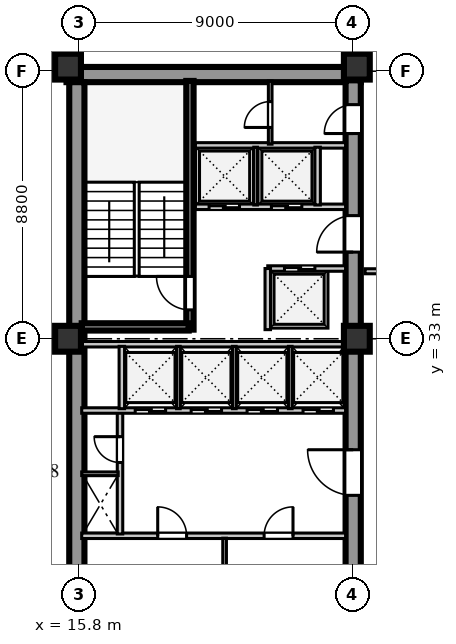
"""IFC4 building model, lengths in metres.
Left out: names, types, materials, properties, quantities, classifications, styles, units other than length and angle.
Written with IfcOpenShell. Run it as: python <this file> out.ifc"""

import sys

from ifc_helpers import new_model, si_unit, direction, frame, frame_2d, origin, origin_2d, place, context, subcontext, project, spatial, rectangle, extrude, element, fill, save


model = new_model("IFC4")
c1 = context("Model", 3, precision=1e-05, world=origin(), true_north=direction((0.0, 1.0)))
c2 = subcontext(c1, "Body", "Model", "MODEL_VIEW")
j1 = project(units=[si_unit("LENGTHUNIT", "METRE"), si_unit("PLANEANGLEUNIT", "RADIAN")], contexts=[c1])
p1 = place(None, origin())
s1 = spatial("IfcSite", under=j1, at=p1, CompositionType="ELEMENT")
p2 = place(p1, origin())
s2 = spatial("IfcBuilding", under=s1, at=p2, CompositionType="ELEMENT")
p3 = place(p2, frame((0.0, 0.0, 142.5)))
s3 = spatial("IfcBuildingStorey", under=s2, at=p3, CompositionType="ELEMENT", Elevation=142.5)
p4 = place(p3, frame((15.4, 41.69, 0.0), z_axis=(0.0, 0.0, 1.0), x_axis=(1.0, 0.0, 0.0)))
e1 = element("IfcWall", 1, at=p4, inside=s3, PredefinedType="SHEAR", context=c2, shape_type="SweptSolid", body=[
    extrude(rectangle(XDim=9.68, YDim=0.5, at=frame_2d((4.84, 0.0))), origin(), (0.0, 0.0, 1.0), 3.6),
])
p5 = place(p3, frame((15.74, 15.81, 0.0), z_axis=(0.0, 0.0, 1.0), x_axis=(0.0, 1.0, 0.0)))
e2 = element("IfcWall", 2, at=p5, inside=s3, PredefinedType="SHEAR", context=c2, shape_type="SweptSolid", body=[
    extrude(rectangle(XDim=25.63, YDim=0.5, at=frame_2d((12.815, 0.0))), origin(), (0.0, 0.0, 1.0), 3.6),
])
p6 = place(p3, frame((24.83, 15.74, 0.0), z_axis=(0.0, 0.0, 1.0), x_axis=(0.0, 1.0, 0.0)))
e3 = element("IfcWall", 3, at=p6, inside=s3, PredefinedType="SHEAR", context=c2, shape_type="SweptSolid", body=[
    extrude(rectangle(XDim=25.76, YDim=0.5, at=frame_2d((12.88, 0.0))), origin(), (0.0, 0.0, 1.0), 3.6),
])
p7 = place(p6, frame((1.61, 0.0, 0.0)))
e4 = element("IfcOpeningElement", 4, at=p7, cuts=e3, PredefinedType="OPENING", context=c2, shape_type="SweptSolid", body=[
    extrude(rectangle(XDim=1.2, YDim=2.1, at=frame_2d((0.6, 1.05))), frame((0.0, 0.26, 0.0), z_axis=(0.0, -1.0, 0.0), x_axis=(1.0, 0.0, 0.0)), (0.0, 0.0, 1.0), 0.52),
])
p8 = place(p6, frame((6.78, 0.0, 0.0)))
e5 = element("IfcOpeningElement", 5, at=p8, cuts=e3, PredefinedType="OPENING", context=c2, shape_type="SweptSolid", body=[
    extrude(rectangle(XDim=0.85, YDim=2.06, at=frame_2d((0.425, 1.03))), frame((0.0, 0.26, 0.0), z_axis=(0.0, -1.0, 0.0), x_axis=(1.0, 0.0, 0.0)), (0.0, 0.0, 1.0), 0.52),
])
p9 = place(p6, frame((12.11, 0.0, 0.0)))
e6 = element("IfcOpeningElement", 6, at=p9, cuts=e3, PredefinedType="OPENING", context=c2, shape_type="SweptSolid", body=[
    extrude(rectangle(XDim=1.5, YDim=2.12, at=frame_2d((0.75, 1.06))), frame((0.0, 0.26, 0.0), z_axis=(0.0, -1.0, 0.0), x_axis=(1.0, 0.0, 0.0)), (0.0, 0.0, 1.0), 0.52),
])
p10 = place(p6, frame((20.11, 0.0, 0.0)))
e7 = element("IfcOpeningElement", 7, at=p10, cuts=e3, PredefinedType="OPENING", context=c2, shape_type="SweptSolid", body=[
    extrude(rectangle(XDim=1.2, YDim=2.12, at=frame_2d((0.6, 1.06))), frame((0.0, 0.26, 0.0), z_axis=(0.0, -1.0, 0.0), x_axis=(1.0, 0.0, 0.0)), (0.0, 0.0, 1.0), 0.52),
])
p11 = place(p6, frame((24.01, 0.0, 0.0)))
e8 = element("IfcOpeningElement", 8, at=p11, cuts=e3, PredefinedType="OPENING", context=c2, shape_type="SweptSolid", body=[
    extrude(rectangle(XDim=0.95, YDim=2.1, at=frame_2d((0.475, 1.05))), frame((0.0, 0.26, 0.0), z_axis=(0.0, -1.0, 0.0), x_axis=(1.0, 0.0, 0.0)), (0.0, 0.0, 1.0), 0.52),
])
for number, where, z_axis, x_axis in (
    (9, (15.45, 33.0, 0.0), (0.0, 0.0, 1.0), (1.0, 0.0, 0.0)),
    (10, (15.45, 41.95, 0.0), (0.0, 0.0, 1.0), (1.0, 0.0, 0.0)),
    (11, (24.95, 33.0, 0.0), (0.0, 0.0, 1.0), (1.0, 0.0, 0.0)),
    (12, (24.95, 41.95, 0.0), (0.0, 0.0, 1.0), (1.0, 0.0, 0.0)),
):
    element("IfcColumn", number, at=place(p3, frame(where, z_axis=z_axis, x_axis=x_axis)), inside=s3, PredefinedType="COLUMN", context=c2, shape_type="SweptSolid", body=[
        extrude(rectangle(XDim=0.85, YDim=0.85, at=origin_2d()), origin(), (0.0, 0.0, 1.0), 3.6),
    ])
p12 = place(p3, frame((15.9, 26.52, 0.0), z_axis=(0.0, 0.0, 1.0), x_axis=(1.0, 0.0, 0.0)))
e13 = element("IfcWall", 13, at=p12, inside=s3, PredefinedType="SOLIDWALL", context=c2, shape_type="SweptSolid", body=[
    extrude(rectangle(XDim=8.68, YDim=0.18, at=frame_2d((4.34, 0.0))), origin(), (0.0, 0.0, 1.0), 3.6),
])
p13 = place(p12, frame((2.5, 0.0, 0.0)))
e14 = element("IfcOpeningElement", 14, at=p13, cuts=e13, PredefinedType="OPENING", context=c2, shape_type="SweptSolid", body=[
    extrude(rectangle(XDim=0.95, YDim=2.1, at=frame_2d((0.475, 1.05))), frame((0.0, 0.1, 0.0), z_axis=(0.0, -1.0, 0.0), x_axis=(1.0, 0.0, 0.0)), (0.0, 0.0, 1.0), 0.2),
])
p14 = place(p12, frame((6.0, 0.0, 0.0)))
e15 = element("IfcOpeningElement", 15, at=p14, cuts=e13, PredefinedType="OPENING", context=c2, shape_type="SweptSolid", body=[
    extrude(rectangle(XDim=0.95, YDim=2.1, at=frame_2d((0.475, 1.05))), frame((0.0, 0.1, 0.0), z_axis=(0.0, -1.0, 0.0), x_axis=(1.0, 0.0, 0.0)), (0.0, 0.0, 1.0), 0.2),
])
p15 = place(p3, frame((20.6, 24.42, 0.0), z_axis=(0.0, 0.0, 1.0), x_axis=(0.0, 1.0, 0.0)))
e16 = element("IfcWall", 16, at=p15, inside=s3, PredefinedType="PARTITIONING", context=c2, shape_type="SweptSolid", body=[
    extrude(rectangle(XDim=2.02, YDim=0.12, at=frame_2d((1.01, 0.0))), origin(), (0.0, 0.0, 1.0), 3.6),
])
p16 = place(p3, frame((17.16, 26.58, 0.0), z_axis=(0.0, 0.0, 1.0), x_axis=(0.0, 1.0, 0.0)))
e17 = element("IfcWall", 17, at=p16, inside=s3, PredefinedType="SOLIDWALL", context=c2, shape_type="SweptSolid", body=[
    extrude(rectangle(XDim=4.02, YDim=0.18, at=frame_2d((2.01, 0.0))), origin(), (0.0, 0.0, 1.0), 3.6),
])
p17 = place(p16, frame((2.35, 0.0, 0.0)))
e18 = element("IfcOpeningElement", 18, at=p17, cuts=e17, PredefinedType="OPENING", context=c2, shape_type="SweptSolid", body=[
    extrude(rectangle(XDim=0.85, YDim=2.06, at=frame_2d((0.425, 1.03))), frame((0.0, 0.1, 0.0), z_axis=(0.0, -1.0, 0.0), x_axis=(1.0, 0.0, 0.0)), (0.0, 0.0, 1.0), 0.2),
])
p18 = place(p3, frame((15.9, 28.56, 0.0), z_axis=(0.0, 0.0, 1.0), x_axis=(1.0, 0.0, 0.0)))
e19 = element("IfcWall", 19, at=p18, inside=s3, PredefinedType="PARTITIONING", context=c2, shape_type="SweptSolid", body=[
    extrude(rectangle(XDim=1.2, YDim=0.12, at=frame_2d((0.6, 0.0))), origin(), (0.0, 0.0, 1.0), 3.6),
])
p19 = place(p3, frame((15.9, 30.64, 0.0), z_axis=(0.0, 0.0, 1.0), x_axis=(1.0, 0.0, 0.0)))
e20 = element("IfcWall", 20, at=p19, inside=s3, PredefinedType="SOLIDWALL", context=c2, shape_type="SweptSolid", body=[
    extrude(rectangle(XDim=8.68, YDim=0.18, at=frame_2d((4.34, 0.0))), origin(), (0.0, 0.0, 1.0), 3.6),
])
p20 = place(p19, frame((1.76, 0.0, 0.0)))
e21 = element("IfcOpeningElement", 21, at=p20, cuts=e20, PredefinedType="OPENING", context=c2, shape_type="SweptSolid", body=[
    extrude(rectangle(XDim=1.0, YDim=2.1, at=frame_2d((0.5, 1.05))), frame((0.0, 0.1, 0.0), z_axis=(0.0, -1.0, 0.0), x_axis=(1.0, 0.0, 0.0)), (0.0, 0.0, 1.0), 0.2),
])
p21 = place(p19, frame((3.6, 0.0, 0.0)))
e22 = element("IfcOpeningElement", 22, at=p21, cuts=e20, PredefinedType="OPENING", context=c2, shape_type="SweptSolid", body=[
    extrude(rectangle(XDim=1.0, YDim=2.1, at=frame_2d((0.5, 1.05))), frame((0.0, 0.1, 0.0), z_axis=(0.0, -1.0, 0.0), x_axis=(1.0, 0.0, 0.0)), (0.0, 0.0, 1.0), 0.2),
])
p22 = place(p19, frame((5.44, 0.0, 0.0)))
e23 = element("IfcOpeningElement", 23, at=p22, cuts=e20, PredefinedType="OPENING", context=c2, shape_type="SweptSolid", body=[
    extrude(rectangle(XDim=1.0, YDim=2.1, at=frame_2d((0.5, 1.05))), frame((0.0, 0.1, 0.0), z_axis=(0.0, -1.0, 0.0), x_axis=(1.0, 0.0, 0.0)), (0.0, 0.0, 1.0), 0.2),
])
p23 = place(p19, frame((7.28, 0.0, 0.0)))
e24 = element("IfcOpeningElement", 24, at=p23, cuts=e20, PredefinedType="OPENING", context=c2, shape_type="SweptSolid", body=[
    extrude(rectangle(XDim=1.0, YDim=2.1, at=frame_2d((0.5, 1.05))), frame((0.0, 0.1, 0.0), z_axis=(0.0, -1.0, 0.0), x_axis=(1.0, 0.0, 0.0)), (0.0, 0.0, 1.0), 0.2),
])
p24 = place(p3, frame((15.9, 32.82, 0.0), z_axis=(0.0, 0.0, 1.0), x_axis=(1.0, 0.0, 0.0)))
e25 = element("IfcWall", 25, at=p24, inside=s3, PredefinedType="SOLIDWALL", context=c2, shape_type="SweptSolid", body=[
    extrude(rectangle(XDim=8.68, YDim=0.18, at=frame_2d((4.34, 0.0))), origin(), (0.0, 0.0, 1.0), 2.95),
])
p25 = place(p3, frame((17.22, 30.7, 0.0), z_axis=(0.0, 0.0, 1.0), x_axis=(0.0, 1.0, 0.0)))
e26 = element("IfcWall", 26, at=p25, inside=s3, PredefinedType="SOLIDWALL", context=c2, shape_type="SweptSolid", body=[
    extrude(rectangle(XDim=2.05, YDim=0.18, at=frame_2d((1.025, 0.0))), origin(), (0.0, 0.0, 1.0), 3.6),
])
for number, where, z_axis, x_axis in (
    (27, (19.08, 30.7, 0.0), (0.0, 0.0, 1.0), (0.0, 1.0, 0.0)),
    (28, (20.92, 30.7, 0.0), (0.0, 0.0, 1.0), (0.0, 1.0, 0.0)),
    (29, (22.76, 30.7, 0.0), (0.0, 0.0, 1.0), (0.0, 1.0, 0.0)),
):
    element("IfcWall", number, at=place(p3, frame(where, z_axis=z_axis, x_axis=x_axis)), inside=s3, PredefinedType="PARTITIONING", context=c2, shape_type="SweptSolid", body=[
        extrude(rectangle(XDim=2.05, YDim=0.12, at=frame_2d((1.025, 0.0))), origin(), (0.0, 0.0, 1.0), 3.6),
    ])
p26 = place(p3, frame((19.46, 33.3, 0.0), z_axis=(0.0, 0.0, 1.0), x_axis=(0.0, 1.0, 0.0)))
e30 = element("IfcWall", 30, at=p26, inside=s3, PredefinedType="SHEAR", context=c2, shape_type="SweptSolid", body=[
    extrude(rectangle(XDim=8.18, YDim=0.24, at=frame_2d((4.09, 0.0))), origin(), (0.0, 0.0, 1.0), 3.85),
])
p27 = place(p26, frame((0.65, 0.0, 0.0)))
e31 = element("IfcOpeningElement", 31, at=p27, cuts=e30, PredefinedType="OPENING", context=c2, shape_type="SweptSolid", body=[
    extrude(rectangle(XDim=1.1, YDim=2.1, at=frame_2d((0.55, 1.05))), frame((0.0, 0.13, 0.0), z_axis=(0.0, -1.0, 0.0), x_axis=(1.0, 0.0, 0.0)), (0.0, 0.0, 1.0), 0.26),
])
p28 = place(p3, frame((15.9, 33.39, 0.0), z_axis=(0.0, 0.0, 1.0), x_axis=(1.0, 0.0, 0.0)))
e32 = element("IfcWall", 32, at=p28, inside=s3, PredefinedType="SHEAR", context=c2, shape_type="SweptSolid", body=[
    extrude(rectangle(XDim=3.52, YDim=0.24, at=frame_2d((1.76, 0.0))), origin(), (0.0, 0.0, 1.0), 3.85),
])
p29 = place(p3, frame((22.02, 35.31, 0.0), z_axis=(0.0, 0.0, 1.0), x_axis=(1.0, 0.0, 0.0)))
e33 = element("IfcWall", 33, at=p29, inside=s3, PredefinedType="SOLIDWALL", context=c2, shape_type="SweptSolid", body=[
    extrude(rectangle(XDim=2.56, YDim=0.18, at=frame_2d((1.28, 0.0))), origin(), (0.0, 0.0, 1.0), 3.6),
])
p30 = place(p29, frame((0.55, 0.0, 0.0)))
e34 = element("IfcOpeningElement", 34, at=p30, cuts=e33, PredefinedType="OPENING", context=c2, shape_type="SweptSolid", body=[
    extrude(rectangle(XDim=1.0, YDim=2.1, at=frame_2d((0.5, 1.05))), frame((0.0, 0.1, 0.0), z_axis=(0.0, -1.0, 0.0), x_axis=(1.0, 0.0, 0.0)), (0.0, 0.0, 1.0), 0.2),
])
p31 = place(p3, frame((22.02, 33.3, 0.0), z_axis=(0.0, 0.0, 1.0), x_axis=(0.0, 1.0, 0.0)))
e35 = element("IfcWall", 35, at=p31, inside=s3, PredefinedType="SOLIDWALL", context=c2, shape_type="SweptSolid", body=[
    extrude(rectangle(XDim=2.01, YDim=0.18, at=frame_2d((1.005, 0.0))), origin(), (0.0, 0.0, 1.0), 3.6),
])
p32 = place(p3, frame((19.64, 37.34, 0.0), z_axis=(0.0, 0.0, 1.0), x_axis=(1.0, 0.0, 0.0)))
e36 = element("IfcWall", 36, at=p32, inside=s3, PredefinedType="SOLIDWALL", context=c2, shape_type="SweptSolid", body=[
    extrude(rectangle(XDim=4.94, YDim=0.18, at=frame_2d((2.47, 0.0))), origin(), (0.0, 0.0, 1.0), 3.6),
])
p33 = place(p32, frame((0.45, 0.0, 0.0)))
e37 = element("IfcOpeningElement", 37, at=p33, cuts=e36, PredefinedType="OPENING", context=c2, shape_type="SweptSolid", body=[
    extrude(rectangle(XDim=1.0, YDim=2.1, at=frame_2d((0.5, 1.05))), frame((0.0, 0.1, 0.0), z_axis=(0.0, -1.0, 0.0), x_axis=(1.0, 0.0, 0.0)), (0.0, 0.0, 1.0), 0.2),
])
p34 = place(p32, frame((2.5, 0.0, 0.0)))
e38 = element("IfcOpeningElement", 38, at=p34, cuts=e36, PredefinedType="OPENING", context=c2, shape_type="SweptSolid", body=[
    extrude(rectangle(XDim=1.0, YDim=2.1, at=frame_2d((0.5, 1.05))), frame((0.0, 0.1, 0.0), z_axis=(0.0, -1.0, 0.0), x_axis=(1.0, 0.0, 0.0)), (0.0, 0.0, 1.0), 0.2),
])
p35 = place(p3, frame((19.64, 39.36, 0.0), z_axis=(0.0, 0.0, 1.0), x_axis=(1.0, 0.0, 0.0)))
e39 = element("IfcWall", 39, at=p35, inside=s3, PredefinedType="SOLIDWALL", context=c2, shape_type="SweptSolid", body=[
    extrude(rectangle(XDim=4.94, YDim=0.18, at=frame_2d((2.47, 0.0))), origin(), (0.0, 0.0, 1.0), 3.6),
])
p36 = place(p3, frame((21.62, 37.4, 0.0), z_axis=(0.0, 0.0, 1.0), x_axis=(0.0, 1.0, 0.0)))
e40 = element("IfcWall", 40, at=p36, inside=s3, PredefinedType="PARTITIONING", context=c2, shape_type="SweptSolid", body=[
    extrude(rectangle(XDim=1.9, YDim=0.12, at=frame_2d((0.95, 0.0))), origin(), (0.0, 0.0, 1.0), 3.6),
])
p37 = place(p3, frame((23.66, 37.4, 0.0), z_axis=(0.0, 0.0, 1.0), x_axis=(0.0, 1.0, 0.0)))
e41 = element("IfcWall", 41, at=p37, inside=s3, PredefinedType="SOLIDWALL", context=c2, shape_type="SweptSolid", body=[
    extrude(rectangle(XDim=1.9, YDim=0.18, at=frame_2d((0.95, 0.0))), origin(), (0.0, 0.0, 1.0), 3.6),
])
p38 = place(p3, frame((22.1, 39.4, 0.0), z_axis=(0.0, 0.0, 1.0), x_axis=(0.0, 1.0, 0.0)))
e42 = element("IfcWall", 42, at=p38, inside=s3, PredefinedType="PARTITIONING", context=c2, shape_type="SweptSolid", body=[
    extrude(rectangle(XDim=2.08, YDim=0.12, at=frame_2d((1.04, 0.0))), origin(), (0.0, 0.0, 1.0), 3.6),
])
p39 = place(p38, frame((0.55, 0.0, 0.0)))
e43 = element("IfcOpeningElement", 43, at=p39, cuts=e42, PredefinedType="OPENING", context=c2, shape_type="SweptSolid", body=[
    extrude(rectangle(XDim=0.85, YDim=2.06, at=frame_2d((0.425, 1.03))), frame((0.0, 0.07, 0.0), z_axis=(0.0, -1.0, 0.0), x_axis=(1.0, 0.0, 0.0)), (0.0, 0.0, 1.0), 0.14),
])
p40 = place(p3, frame((25.22, 35.22, 0.0), z_axis=(0.0, 0.0, 1.0), x_axis=(1.0, 0.0, 0.0)))
e44 = element("IfcWall", 44, at=p40, inside=s3, PredefinedType="PARTITIONING", context=c2, shape_type="SweptSolid", body=[
    extrude(rectangle(XDim=9.5, YDim=0.165, at=frame_2d((4.75, 0.0))), origin(), (0.0, 0.0, 1.0), 3.6),
])
p41 = place(p40, frame((0.65, 0.0, 0.0)))
e45 = element("IfcOpeningElement", 45, at=p41, cuts=e44, PredefinedType="OPENING", context=c2, shape_type="SweptSolid", body=[
    extrude(rectangle(XDim=0.95, YDim=2.1, at=frame_2d((0.475, 1.05))), frame((0.0, 0.093, 0.0), z_axis=(0.0, -1.0, 0.0), x_axis=(1.0, 0.0, 0.0)), (0.0, 0.0, 1.0), 0.185),
])
p42 = place(p40, frame((5.4, 0.0, 0.0)))
e46 = element("IfcOpeningElement", 46, at=p42, cuts=e44, PredefinedType="OPENING", context=c2, shape_type="SweptSolid", body=[
    extrude(rectangle(XDim=1.05, YDim=2.1, at=frame_2d((0.525, 1.05))), frame((0.0, 0.093, 0.0), z_axis=(0.0, -1.0, 0.0), x_axis=(1.0, 0.0, 0.0)), (0.0, 0.0, 1.0), 0.185),
])
p43 = place(p13, origin())
e47 = element("IfcDoor", 47, at=p43, inside=s3, OperationType="SINGLE_SWING_LEFT", PredefinedType="DOOR", context=c2, shape_type="SweptSolid", body=[
    extrude(rectangle(XDim=0.95, YDim=2.1, at=frame_2d((0.475, 1.05))), frame((0.0, 0.025, 0.0), z_axis=(0.0, -1.0, 0.0), x_axis=(1.0, 0.0, 0.0)), (0.0, 0.0, 1.0), 0.05),
])
fill(e14, e47)
p44 = place(p14, origin())
e48 = element("IfcDoor", 48, at=p44, inside=s3, OperationType="SINGLE_SWING_RIGHT", PredefinedType="DOOR", context=c2, shape_type="SweptSolid", body=[
    extrude(rectangle(XDim=0.95, YDim=2.1, at=frame_2d((0.475, 1.05))), frame((0.0, 0.025, 0.0), z_axis=(0.0, -1.0, 0.0), x_axis=(1.0, 0.0, 0.0)), (0.0, 0.0, 1.0), 0.05),
])
fill(e15, e48)
p45 = place(p17, origin())
e49 = element("IfcDoor", 49, at=p45, inside=s3, OperationType="SINGLE_SWING_RIGHT", PredefinedType="DOOR", context=c2, shape_type="SweptSolid", body=[
    extrude(rectangle(XDim=0.85, YDim=2.06, at=frame_2d((0.425, 1.03))), frame((0.0, 0.025, 0.0), z_axis=(0.0, -1.0, 0.0), x_axis=(1.0, 0.0, 0.0)), (0.0, 0.0, 1.0), 0.05),
])
fill(e18, e49)
p46 = place(p9, frame((1.5, 0.0, 0.0), z_axis=(0.0, 0.0, 1.0), x_axis=(-1.0, 0.0, 0.0)))
e50 = element("IfcDoor", 50, at=p46, inside=s3, OperationType="SINGLE_SWING_LEFT", PredefinedType="DOOR", context=c2, shape_type="SweptSolid", body=[
    extrude(rectangle(XDim=1.5, YDim=2.12, at=frame_2d((0.75, 1.06))), frame((0.0, 0.025, 0.0), z_axis=(0.0, -1.0, 0.0), x_axis=(1.0, 0.0, 0.0)), (0.0, 0.0, 1.0), 0.05),
])
fill(e6, e50)
p47 = place(p20, frame((1.0, 0.0, 0.0), z_axis=(0.0, 0.0, 1.0), x_axis=(-1.0, 0.0, 0.0)))
e51 = element("IfcDoor", 51, at=p47, inside=s3, OperationType="DOUBLE_DOOR_SLIDING", PredefinedType="DOOR", context=c2, shape_type="SweptSolid", body=[
    extrude(rectangle(XDim=1.0, YDim=2.1, at=frame_2d((0.5, 1.05))), frame((0.0, 0.025, 0.0), z_axis=(0.0, -1.0, 0.0), x_axis=(1.0, 0.0, 0.0)), (0.0, 0.0, 1.0), 0.05),
])
fill(e21, e51)
p48 = place(p21, frame((1.0, 0.0, 0.0), z_axis=(0.0, 0.0, 1.0), x_axis=(-1.0, 0.0, 0.0)))
e52 = element("IfcDoor", 52, at=p48, inside=s3, OperationType="DOUBLE_DOOR_SLIDING", PredefinedType="DOOR", context=c2, shape_type="SweptSolid", body=[
    extrude(rectangle(XDim=1.0, YDim=2.1, at=frame_2d((0.5, 1.05))), frame((0.0, 0.025, 0.0), z_axis=(0.0, -1.0, 0.0), x_axis=(1.0, 0.0, 0.0)), (0.0, 0.0, 1.0), 0.05),
])
fill(e22, e52)
p49 = place(p22, frame((1.0, 0.0, 0.0), z_axis=(0.0, 0.0, 1.0), x_axis=(-1.0, 0.0, 0.0)))
e53 = element("IfcDoor", 53, at=p49, inside=s3, OperationType="DOUBLE_DOOR_SLIDING", PredefinedType="DOOR", context=c2, shape_type="SweptSolid", body=[
    extrude(rectangle(XDim=1.0, YDim=2.1, at=frame_2d((0.5, 1.05))), frame((0.0, 0.025, 0.0), z_axis=(0.0, -1.0, 0.0), x_axis=(1.0, 0.0, 0.0)), (0.0, 0.0, 1.0), 0.05),
])
fill(e23, e53)
p50 = place(p23, frame((1.0, 0.0, 0.0), z_axis=(0.0, 0.0, 1.0), x_axis=(-1.0, 0.0, 0.0)))
e54 = element("IfcDoor", 54, at=p50, inside=s3, OperationType="DOUBLE_DOOR_SLIDING", PredefinedType="DOOR", context=c2, shape_type="SweptSolid", body=[
    extrude(rectangle(XDim=1.0, YDim=2.1, at=frame_2d((0.5, 1.05))), frame((0.0, 0.025, 0.0), z_axis=(0.0, -1.0, 0.0), x_axis=(1.0, 0.0, 0.0)), (0.0, 0.0, 1.0), 0.05),
])
fill(e24, e54)
p51 = place(p27, origin())
e55 = element("IfcDoor", 55, at=p51, inside=s3, OperationType="SINGLE_SWING_RIGHT", PredefinedType="DOOR", context=c2, shape_type="SweptSolid", body=[
    extrude(rectangle(XDim=1.1, YDim=2.1, at=frame_2d((0.55, 1.05))), frame((0.0, 0.025, 0.0), z_axis=(0.0, -1.0, 0.0), x_axis=(1.0, 0.0, 0.0)), (0.0, 0.0, 1.0), 0.05),
])
fill(e31, e55)
p52 = place(p10, frame((1.2, 0.0, 0.0), z_axis=(0.0, 0.0, 1.0), x_axis=(-1.0, 0.0, 0.0)))
e56 = element("IfcDoor", 56, at=p52, inside=s3, OperationType="SINGLE_SWING_RIGHT", PredefinedType="DOOR", context=c2, shape_type="SweptSolid", body=[
    extrude(rectangle(XDim=1.2, YDim=2.12, at=frame_2d((0.6, 1.06))), frame((0.0, 0.025, 0.0), z_axis=(0.0, -1.0, 0.0), x_axis=(1.0, 0.0, 0.0)), (0.0, 0.0, 1.0), 0.05),
])
fill(e7, e56)
p53 = place(p33, frame((1.0, 0.0, 0.0), z_axis=(0.0, 0.0, 1.0), x_axis=(-1.0, 0.0, 0.0)))
e57 = element("IfcDoor", 57, at=p53, inside=s3, OperationType="DOUBLE_DOOR_SLIDING", PredefinedType="DOOR", context=c2, shape_type="SweptSolid", body=[
    extrude(rectangle(XDim=1.0, YDim=2.1, at=frame_2d((0.5, 1.05))), frame((0.0, 0.025, 0.0), z_axis=(0.0, -1.0, 0.0), x_axis=(1.0, 0.0, 0.0)), (0.0, 0.0, 1.0), 0.05),
])
fill(e37, e57)
p54 = place(p34, frame((1.0, 0.0, 0.0), z_axis=(0.0, 0.0, 1.0), x_axis=(-1.0, 0.0, 0.0)))
e58 = element("IfcDoor", 58, at=p54, inside=s3, OperationType="DOUBLE_DOOR_SLIDING", PredefinedType="DOOR", context=c2, shape_type="SweptSolid", body=[
    extrude(rectangle(XDim=1.0, YDim=2.1, at=frame_2d((0.5, 1.05))), frame((0.0, 0.025, 0.0), z_axis=(0.0, -1.0, 0.0), x_axis=(1.0, 0.0, 0.0)), (0.0, 0.0, 1.0), 0.05),
])
fill(e38, e58)
p55 = place(p30, origin())
e59 = element("IfcDoor", 59, at=p55, inside=s3, OperationType="DOUBLE_DOOR_SLIDING", PredefinedType="DOOR", context=c2, shape_type="SweptSolid", body=[
    extrude(rectangle(XDim=1.0, YDim=2.1, at=frame_2d((0.5, 1.05))), frame((0.0, 0.025, 0.0), z_axis=(0.0, -1.0, 0.0), x_axis=(1.0, 0.0, 0.0)), (0.0, 0.0, 1.0), 0.05),
])
fill(e34, e59)
p56 = place(p39, origin())
e60 = element("IfcDoor", 60, at=p56, inside=s3, OperationType="SINGLE_SWING_LEFT", PredefinedType="DOOR", context=c2, shape_type="SweptSolid", body=[
    extrude(rectangle(XDim=0.85, YDim=2.06, at=frame_2d((0.425, 1.03))), frame((0.0, 0.025, 0.0), z_axis=(0.0, -1.0, 0.0), x_axis=(1.0, 0.0, 0.0)), (0.0, 0.0, 1.0), 0.05),
])
fill(e43, e60)
p57 = place(p11, frame((0.95, 0.0, 0.0), z_axis=(0.0, 0.0, 1.0), x_axis=(-1.0, 0.0, 0.0)))
e61 = element("IfcDoor", 61, at=p57, inside=s3, OperationType="SINGLE_SWING_RIGHT", PredefinedType="DOOR", context=c2, shape_type="SweptSolid", body=[
    extrude(rectangle(XDim=0.95, YDim=2.1, at=frame_2d((0.475, 1.05))), frame((0.0, 0.025, 0.0), z_axis=(0.0, -1.0, 0.0), x_axis=(1.0, 0.0, 0.0)), (0.0, 0.0, 1.0), 0.05),
])
fill(e8, e61)
save(model, sys.argv[1])
